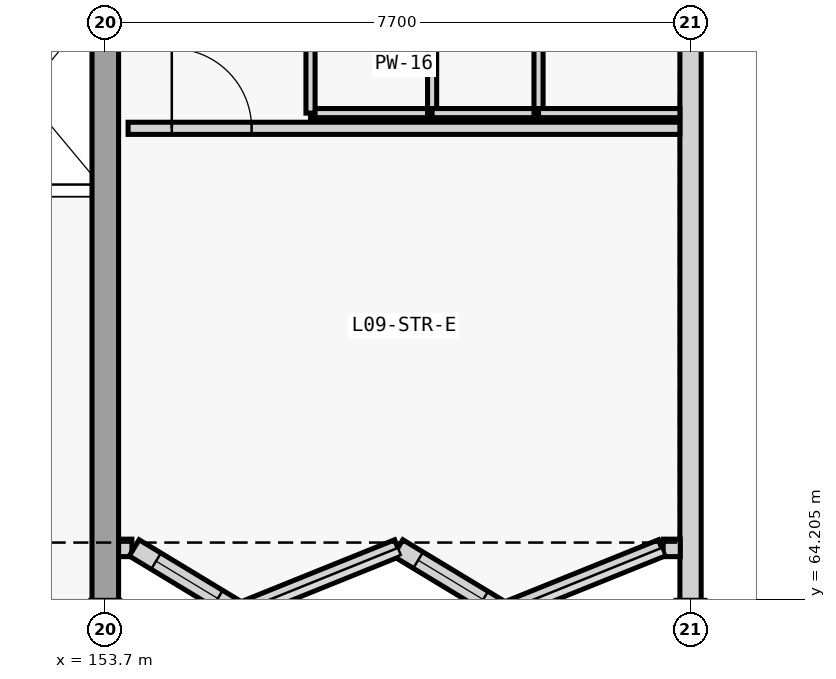
"""IFC4 building model, lengths in metres.
Left out: names, types, materials, properties, quantities, classifications, styles, units other than length and angle.
Written with IfcOpenShell. Run it as: python <this file> out.ifc"""

import sys

from ifc_helpers import new_model, si_unit, direction, frame, frame_2d, origin, place, context, subcontext, project, spatial, rectangle, extrude, element, fill, save


model = new_model("IFC4")
c1 = context("Model", 3, precision=1e-05, world=origin(), true_north=direction((0.0, 1.0)))
c2 = subcontext(c1, "Body", "Model", "MODEL_VIEW")
j1 = project(units=[si_unit("LENGTHUNIT", "METRE"), si_unit("PLANEANGLEUNIT", "RADIAN")], contexts=[c1])
p1 = place(None, origin())
s1 = spatial("IfcSite", under=j1, at=p1, CompositionType="ELEMENT")
p2 = place(p1, origin())
s2 = spatial("IfcBuilding", under=s1, at=p2, CompositionType="ELEMENT")
p3 = place(p2, frame((0.0, 0.0, 36.0)))
s3 = spatial("IfcBuildingStorey", under=s2, at=p3, CompositionType="ELEMENT", Elevation=36.0)
p4 = place(p3, frame((161.4, 96.812, 0.0), z_axis=(0.0, 0.0, 1.0), x_axis=(0.0, -1.0, 0.0)))
e1 = element("IfcWall", 1, at=p4, inside=s3, PredefinedType="SOLIDWALL", context=c2, shape_type="SweptSolid", body=[
    extrude(rectangle(XDim=32.624, YDim=0.28, at=frame_2d((16.312, 0.0))), origin(), (0.0, 0.0, 1.0), 2.8),
])
p5 = place(p4, frame((17.512, 0.0, 0.82)))
e2 = element("IfcOpeningElement", 2, at=p5, cuts=e1, PredefinedType="OPENING", context=c2, shape_type="SweptSolid", body=[
    extrude(rectangle(XDim=4.4, YDim=1.65, at=frame_2d((2.2, 0.825))), frame((0.0, 0.15, 0.0), z_axis=(0.0, -1.0, 0.0), x_axis=(1.0, 0.0, 0.0)), (0.0, 0.0, 1.0), 0.3),
])
p6 = place(p3, frame((154.05, 64.88, 0.0), z_axis=(0.0, 0.0, 1.0), x_axis=(-1.0, 0.0, 0.0)))
e3 = element("IfcWall", 3, at=p6, inside=s3, PredefinedType="SOLIDWALL", context=c2, shape_type="SweptSolid", body=[
    extrude(rectangle(XDim=0.18, YDim=0.23, at=frame_2d((0.09, 0.0))), origin(), (0.0, 0.0, 1.0), 3.36),
])
p7 = place(p3, frame((161.265, 64.88, 0.0), z_axis=(0.0, 0.0, 1.0), x_axis=(-1.0, 0.0, 0.0)))
e4 = element("IfcWall", 4, at=p7, inside=s3, PredefinedType="SOLIDWALL", context=c2, shape_type="SweptSolid", body=[
    extrude(rectangle(XDim=0.225, YDim=0.23, at=frame_2d((0.112, 0.0))), origin(), (0.0, 0.0, 1.0), 3.36),
])
p8 = place(p3, frame((155.468, 64.04, 0.0), z_axis=(0.0, 0.0, 1.0), x_axis=(-0.855561475997, 0.51770122734, 0.0)))
e5 = element("IfcWall", 5, at=p8, inside=s3, PredefinedType="SOLIDWALL", context=c2, shape_type="SweptSolid", body=[
    extrude(rectangle(XDim=1.622, YDim=0.25, at=frame_2d((0.811, 0.0))), origin(), (0.0, 0.0, 1.0), 3.36),
])
p9 = place(p8, frame((0.336, 0.0, 0.82)))
e6 = element("IfcOpeningElement", 6, at=p9, cuts=e5, PredefinedType="OPENING", context=c2, shape_type="SweptSolid", body=[
    extrude(rectangle(XDim=0.95, YDim=1.5, at=frame_2d((0.475, 0.75))), frame((0.0, 0.135, 0.0), z_axis=(0.0, -1.0, 0.0), x_axis=(1.0, 0.0, 0.0)), (0.0, 0.0, 1.0), 0.27),
])
p10 = place(p3, frame((157.55, 64.88, 0.0), z_axis=(0.0, 0.0, 1.0), x_axis=(-0.927392797001, -0.374089026933, 0.0)))
e7 = element("IfcWall", 7, at=p10, inside=s3, PredefinedType="SOLIDWALL", context=c2, shape_type="SweptSolid", body=[
    extrude(rectangle(XDim=2.245, YDim=0.23, at=frame_2d((1.123, 0.0))), origin(), (0.0, 0.0, 1.0), 3.36),
])
p11 = place(p3, frame((158.938, 64.04, 0.0), z_axis=(0.0, 0.0, 1.0), x_axis=(-0.855561475997, 0.51770122734, 0.0)))
e8 = element("IfcWall", 8, at=p11, inside=s3, PredefinedType="SOLIDWALL", context=c2, shape_type="SweptSolid", body=[
    extrude(rectangle(XDim=1.622, YDim=0.25, at=frame_2d((0.811, 0.0))), origin(), (0.0, 0.0, 1.0), 3.36),
])
p12 = place(p11, frame((0.311, 0.0, 0.82)))
e9 = element("IfcOpeningElement", 9, at=p12, cuts=e8, PredefinedType="OPENING", context=c2, shape_type="SweptSolid", body=[
    extrude(rectangle(XDim=1.0, YDim=1.35, at=frame_2d((0.5, 0.675))), frame((0.0, 0.135, 0.0), z_axis=(0.0, -1.0, 0.0), x_axis=(1.0, 0.0, 0.0)), (0.0, 0.0, 1.0), 0.27),
])
p13 = place(p3, frame((161.02, 64.88, 0.0), z_axis=(0.0, 0.0, 1.0), x_axis=(-0.927392797001, -0.374089026933, 0.0)))
e10 = element("IfcWall", 10, at=p13, inside=s3, PredefinedType="SOLIDWALL", context=c2, shape_type="SweptSolid", body=[
    extrude(rectangle(XDim=2.245, YDim=0.23, at=frame_2d((1.123, 0.0))), origin(), (0.0, 0.0, 1.0), 3.36),
])
p14 = place(p3, frame((153.7, 64.0, 0.0), z_axis=(0.0, 0.0, 1.0), x_axis=(0.0, 1.0, 0.0)))
e11 = element("IfcWall", 11, at=p14, inside=s3, PredefinedType="SHEAR", context=c2, shape_type="SweptSolid", body=[
    extrude(rectangle(XDim=8.4, YDim=0.35, at=frame_2d((4.2, 0.0))), origin(), (0.0, 0.0, 1.0), 3.6),
])
p15 = place(p3, frame((156.4, 70.6, 0.0), z_axis=(0.0, 0.0, 1.0), x_axis=(1.0, 0.0, 0.0)))
e12 = element("IfcWall", 12, at=p15, inside=s3, PredefinedType="PARTITIONING", context=c2, shape_type="SweptSolid", body=[
    extrude(rectangle(XDim=1.6, YDim=0.12, at=frame_2d((0.8, 0.0))), origin(), (0.0, 0.0, 1.0), 3.34),
])
p16 = place(p3, frame((156.4, 70.6, 0.0), z_axis=(0.0, 0.0, 1.0), x_axis=(0.0, 1.0, 0.0)))
e13 = element("IfcWall", 13, at=p16, inside=s3, PredefinedType="PARTITIONING", context=c2, shape_type="SweptSolid", body=[
    extrude(rectangle(XDim=5.2, YDim=0.12, at=frame_2d((2.6, 0.0))), origin(), (0.0, 0.0, 1.0), 3.34),
])
p17 = place(p16, frame((2.16, 0.0, 0.0)))
e14 = element("IfcOpeningElement", 14, at=p17, cuts=e13, PredefinedType="OPENING", context=c2, shape_type="SweptSolid", body=[
    extrude(rectangle(XDim=0.88, YDim=2.1, at=frame_2d((0.44, 1.05))), frame((0.0, 0.07, 0.0), z_axis=(0.0, -1.0, 0.0), x_axis=(1.0, 0.0, 0.0)), (0.0, 0.0, 1.0), 0.14),
])
p18 = place(p3, frame((158.0, 70.6, 0.0), z_axis=(0.0, 0.0, 1.0), x_axis=(0.0, 1.0, 0.0)))
e15 = element("IfcWall", 15, at=p18, inside=s3, PredefinedType="PARTITIONING", context=c2, shape_type="SweptSolid", body=[
    extrude(rectangle(XDim=5.2, YDim=0.12, at=frame_2d((2.6, 0.0))), origin(), (0.0, 0.0, 1.0), 3.34),
])
p19 = place(p3, frame((158.0, 70.6, 0.0), z_axis=(0.0, 0.0, 1.0), x_axis=(1.0, 0.0, 0.0)))
e16 = element("IfcWall", 16, at=p19, inside=s3, PredefinedType="PARTITIONING", context=c2, shape_type="SweptSolid", body=[
    extrude(rectangle(XDim=1.4, YDim=0.12, at=frame_2d((0.7, 0.0))), origin(), (0.0, 0.0, 1.0), 3.34),
])
p20 = place(p3, frame((159.4, 70.6, 0.0), z_axis=(0.0, 0.0, 1.0), x_axis=(0.0, 1.0, 0.0)))
e17 = element("IfcWall", 17, at=p20, inside=s3, PredefinedType="PARTITIONING", context=c2, shape_type="SweptSolid", body=[
    extrude(rectangle(XDim=5.2, YDim=0.12, at=frame_2d((2.6, 0.0))), origin(), (0.0, 0.0, 1.0), 3.34),
])
p21 = place(p3, frame((159.4, 70.6, 0.0), z_axis=(0.0, 0.0, 1.0), x_axis=(1.0, 0.0, 0.0)))
e18 = element("IfcWall", 18, at=p21, inside=s3, PredefinedType="PARTITIONING", context=c2, shape_type="SweptSolid", body=[
    extrude(rectangle(XDim=1.86, YDim=0.12, at=frame_2d((0.93, 0.0))), origin(), (0.0, 0.0, 1.0), 3.34),
])
p22 = place(p3, frame((154.0, 70.4, 0.0), z_axis=(0.0, 0.0, 1.0), x_axis=(1.0, 0.0, 0.0)))
e19 = element("IfcWall", 19, at=p22, inside=s3, PredefinedType="PARTITIONING", context=c2, shape_type="SweptSolid", body=[
    extrude(rectangle(XDim=7.26, YDim=0.16, at=frame_2d((3.63, 0.0))), origin(), (0.0, 0.0, 1.0), 3.34),
])
p23 = place(p22, frame((0.575, 0.0, 0.0)))
e20 = element("IfcOpeningElement", 20, at=p23, cuts=e19, PredefinedType="OPENING", context=c2, shape_type="SweptSolid", body=[
    extrude(rectangle(XDim=1.05, YDim=2.15, at=frame_2d((0.525, 1.075))), frame((0.0, 0.09, 0.0), z_axis=(0.0, -1.0, 0.0), x_axis=(1.0, 0.0, 0.0)), (0.0, 0.0, 1.0), 0.18),
])
p24 = place(p9, origin())
e21 = element("IfcWindow", 21, at=p24, inside=s3, PartitioningType="SINGLE_PANEL", PredefinedType="WINDOW", context=c2, shape_type="SweptSolid", body=[
    extrude(rectangle(XDim=0.95, YDim=1.5, at=frame_2d((0.475, 0.75))), frame((0.0, 0.03, 0.0), z_axis=(0.0, -1.0, 0.0), x_axis=(1.0, 0.0, 0.0)), (0.0, 0.0, 1.0), 0.06),
])
fill(e6, e21)
p25 = place(p12, origin())
e22 = element("IfcWindow", 22, at=p25, inside=s3, PartitioningType="SINGLE_PANEL", PredefinedType="WINDOW", context=c2, shape_type="SweptSolid", body=[
    extrude(rectangle(XDim=1.0, YDim=1.35, at=frame_2d((0.5, 0.675))), frame((0.0, 0.03, 0.0), z_axis=(0.0, -1.0, 0.0), x_axis=(1.0, 0.0, 0.0)), (0.0, 0.0, 1.0), 0.06),
])
fill(e9, e22)
p26 = place(p23, origin())
e23 = element("IfcDoor", 23, at=p26, inside=s3, OperationType="SINGLE_SWING_LEFT", PredefinedType="DOOR", context=c2, shape_type="SweptSolid", body=[
    extrude(rectangle(XDim=1.05, YDim=2.15, at=frame_2d((0.525, 1.075))), frame((0.0, 0.025, 0.0), z_axis=(0.0, -1.0, 0.0), x_axis=(1.0, 0.0, 0.0)), (0.0, 0.0, 1.0), 0.05),
])
fill(e20, e23)
save(model, sys.argv[1])
